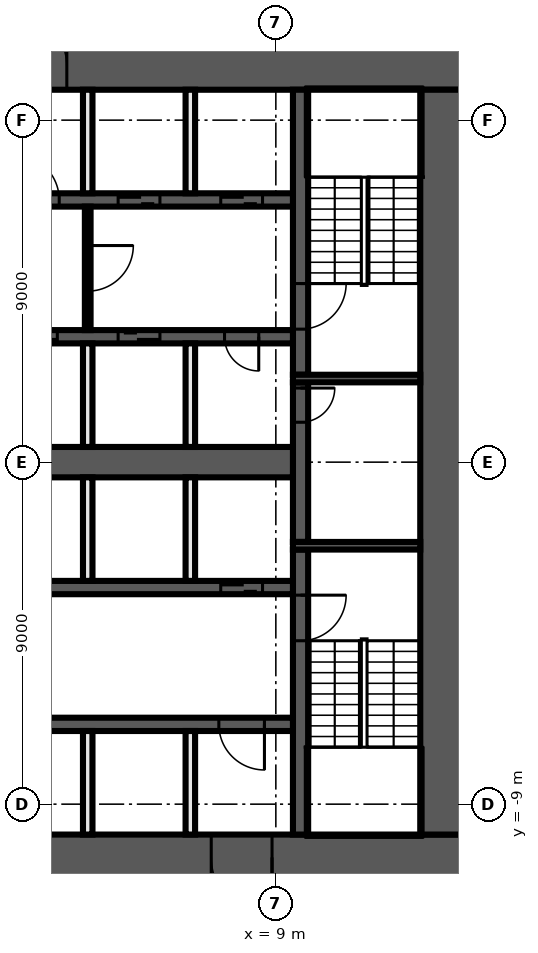
"""IFC4 building model, lengths in metres.
Left out: names, types, materials, properties, quantities, classifications, styles, units other than length and angle.
Written with IfcOpenShell. Run it as: python <this file> out.ifc"""

import sys

from ifc_helpers import new_model, si_unit, direction, frame, frame_2d, origin, place, context, subcontext, project, spatial, rectangle, extrude, element, fill, save


model = new_model("IFC4")
c1 = context("Model", 3, precision=1e-05, world=origin(), true_north=direction((0.0, 1.0)))
c2 = subcontext(c1, "Body", "Model", "MODEL_VIEW")
j1 = project(units=[si_unit("LENGTHUNIT", "METRE"), si_unit("PLANEANGLEUNIT", "RADIAN")], contexts=[c1])
p1 = place(None, origin())
s1 = spatial("IfcSite", under=j1, at=p1, CompositionType="ELEMENT")
p2 = place(p1, origin())
s2 = spatial("IfcBuilding", under=s1, at=p2, CompositionType="ELEMENT")
p3 = place(p2, frame((0.0, 0.0, 47.7)))
s3 = spatial("IfcBuildingStorey", under=s2, at=p3, CompositionType="ELEMENT", Elevation=47.7)
p4 = place(p3, frame((-14.0, 10.4, 0.0), z_axis=(0.0, 0.0, 1.0), x_axis=(1.0, 0.0, 0.0)))
e1 = element("IfcWall", 1, at=p4, inside=s3, PredefinedType="SHEAR", context=c2, shape_type="SweptSolid", body=[
    extrude(rectangle(XDim=28.0, YDim=1.2, at=frame_2d((14.0, 0.0))), origin(), (0.0, 0.0, 1.0), 3.3),
])
p5 = place(p4, frame((15.9, 0.0, 0.0)))
e2 = element("IfcOpeningElement", 2, at=p5, cuts=e1, PredefinedType="OPENING", context=c2, shape_type="SweptSolid", body=[
    extrude(rectangle(XDim=1.6, YDim=2.1, at=frame_2d((0.8, 1.05))), frame((0.0, 0.61, 0.0), z_axis=(0.0, -1.0, 0.0), x_axis=(1.0, 0.0, 0.0)), (0.0, 0.0, 1.0), 1.22),
])
p6 = place(p3, frame((14.0, -10.4, 0.0), z_axis=(0.0, 0.0, 1.0), x_axis=(-1.0, 0.0, 0.0)))
e3 = element("IfcWall", 3, at=p6, inside=s3, PredefinedType="SHEAR", context=c2, shape_type="SweptSolid", body=[
    extrude(rectangle(XDim=28.0, YDim=1.2, at=frame_2d((14.0, 0.0))), origin(), (0.0, 0.0, 1.0), 3.3),
])
p7 = place(p6, frame((5.1, 0.0, 0.0)))
e4 = element("IfcOpeningElement", 4, at=p7, cuts=e3, PredefinedType="OPENING", context=c2, shape_type="SweptSolid", body=[
    extrude(rectangle(XDim=1.6, YDim=2.1, at=frame_2d((0.8, 1.05))), frame((0.0, 0.61, 0.0), z_axis=(0.0, -1.0, 0.0), x_axis=(1.0, 0.0, 0.0)), (0.0, 0.0, 1.0), 1.22),
])
p8 = place(p3, frame((13.4, 9.8, 0.0), z_axis=(0.0, 0.0, 1.0), x_axis=(0.0, -1.0, 0.0)))
e5 = element("IfcWall", 5, at=p8, inside=s3, PredefinedType="SHEAR", context=c2, shape_type="SweptSolid", body=[
    extrude(rectangle(XDim=19.6, YDim=1.2, at=frame_2d((9.8, 0.0))), origin(), (0.0, 0.0, 1.0), 3.3),
])
p9 = place(p3, frame((9.65, -2.3, 0.0), z_axis=(0.0, 0.0, 1.0), x_axis=(0.0, -1.0, 0.0)))
e6 = element("IfcWall", 6, at=p9, inside=s3, PredefinedType="SHEAR", context=c2, shape_type="SweptSolid", body=[
    extrude(rectangle(XDim=7.5, YDim=0.4, at=frame_2d((3.75, 0.0))), origin(), (0.0, 0.0, 1.0), 3.3),
])
p10 = place(p9, frame((1.2, 0.0, 0.0)))
e7 = element("IfcOpeningElement", 7, at=p10, cuts=e6, PredefinedType="OPENING", context=c2, shape_type="SweptSolid", body=[
    extrude(rectangle(XDim=1.2, YDim=2.1, at=frame_2d((0.6, 1.05))), frame((0.0, 0.21, 0.0), z_axis=(0.0, -1.0, 0.0), x_axis=(1.0, 0.0, 0.0)), (0.0, 0.0, 1.0), 0.42),
])
p11 = place(p3, frame((9.65, 2.1, 0.0), z_axis=(0.0, 0.0, 1.0), x_axis=(0.0, -1.0, 0.0)))
e8 = element("IfcWall", 8, at=p11, inside=s3, PredefinedType="SHEAR", context=c2, shape_type="SweptSolid", body=[
    extrude(rectangle(XDim=4.2, YDim=0.4, at=frame_2d((2.1, 0.0))), origin(), (0.0, 0.0, 1.0), 3.3),
])
p12 = place(p11, frame((0.15, 0.0, 0.0)))
e9 = element("IfcOpeningElement", 9, at=p12, cuts=e8, PredefinedType="OPENING", context=c2, shape_type="SweptSolid", body=[
    extrude(rectangle(XDim=0.9, YDim=2.1, at=frame_2d((0.45, 1.05))), frame((0.0, 0.21, 0.0), z_axis=(0.0, -1.0, 0.0), x_axis=(1.0, 0.0, 0.0)), (0.0, 0.0, 1.0), 0.42),
])
p13 = place(p3, frame((9.65, 9.8, 0.0), z_axis=(0.0, 0.0, 1.0), x_axis=(0.0, -1.0, 0.0)))
e10 = element("IfcWall", 10, at=p13, inside=s3, PredefinedType="SHEAR", context=c2, shape_type="SweptSolid", body=[
    extrude(rectangle(XDim=7.5, YDim=0.4, at=frame_2d((3.75, 0.0))), origin(), (0.0, 0.0, 1.0), 3.3),
])
p14 = place(p13, frame((5.1, 0.0, 0.0)))
e11 = element("IfcOpeningElement", 11, at=p14, cuts=e10, PredefinedType="OPENING", context=c2, shape_type="SweptSolid", body=[
    extrude(rectangle(XDim=1.2, YDim=2.1, at=frame_2d((0.6, 1.05))), frame((0.0, 0.21, 0.0), z_axis=(0.0, -1.0, 0.0), x_axis=(1.0, 0.0, 0.0)), (0.0, 0.0, 1.0), 0.42),
])
for number, where, z_axis, x_axis in (
    (12, (9.45, 2.2, 0.0), (0.0, 0.0, 1.0), (1.0, 0.0, 0.0)),
    (13, (9.45, -2.2, 0.0), (0.0, 0.0, 1.0), (1.0, 0.0, 0.0)),
):
    element("IfcWall", number, at=place(p3, frame(where, z_axis=z_axis, x_axis=x_axis)), inside=s3, PredefinedType="SHEAR", context=c2, shape_type="SweptSolid", body=[
        extrude(rectangle(XDim=3.35, YDim=0.2, at=frame_2d((1.675, 0.0))), origin(), (0.0, 0.0, 1.0), 3.3),
    ])
p15 = place(p3, frame((-9.45, 6.9, 0.0), z_axis=(0.0, 0.0, 1.0), x_axis=(1.0, 0.0, 0.0)))
e14 = element("IfcWall", 14, at=p15, inside=s3, PredefinedType="SHEAR", context=c2, shape_type="SweptSolid", body=[
    extrude(rectangle(XDim=18.9, YDim=0.35, at=frame_2d((9.45, 0.0))), origin(), (0.0, 0.0, 1.0), 3.3),
])
p16 = place(p15, frame((0.8, 0.0, 0.0)))
e15 = element("IfcOpeningElement", 15, at=p16, cuts=e14, PredefinedType="OPENING", context=c2, shape_type="SweptSolid", body=[
    extrude(rectangle(XDim=1.1, YDim=2.1, at=frame_2d((0.55, 1.05))), frame((0.0, 0.185, 0.0), z_axis=(0.0, -1.0, 0.0), x_axis=(1.0, 0.0, 0.0)), (0.0, 0.0, 1.0), 0.37),
])
p17 = place(p15, frame((3.5, 0.0, 0.0)))
e16 = element("IfcOpeningElement", 16, at=p17, cuts=e14, PredefinedType="OPENING", context=c2, shape_type="SweptSolid", body=[
    extrude(rectangle(XDim=1.1, YDim=2.1, at=frame_2d((0.55, 1.05))), frame((0.0, 0.185, 0.0), z_axis=(0.0, -1.0, 0.0), x_axis=(1.0, 0.0, 0.0)), (0.0, 0.0, 1.0), 0.37),
])
p18 = place(p15, frame((6.2, 0.0, 0.0)))
e17 = element("IfcOpeningElement", 17, at=p18, cuts=e14, PredefinedType="OPENING", context=c2, shape_type="SweptSolid", body=[
    extrude(rectangle(XDim=1.1, YDim=2.1, at=frame_2d((0.55, 1.05))), frame((0.0, 0.185, 0.0), z_axis=(0.0, -1.0, 0.0), x_axis=(1.0, 0.0, 0.0)), (0.0, 0.0, 1.0), 0.37),
])
p19 = place(p15, frame((8.9, 0.0, 0.0)))
e18 = element("IfcOpeningElement", 18, at=p19, cuts=e14, PredefinedType="OPENING", context=c2, shape_type="SweptSolid", body=[
    extrude(rectangle(XDim=1.1, YDim=2.1, at=frame_2d((0.55, 1.05))), frame((0.0, 0.185, 0.0), z_axis=(0.0, -1.0, 0.0), x_axis=(1.0, 0.0, 0.0)), (0.0, 0.0, 1.0), 0.37),
])
p20 = place(p15, frame((11.55, 0.0, 0.0)))
e19 = element("IfcOpeningElement", 19, at=p20, cuts=e14, PredefinedType="OPENING", context=c2, shape_type="SweptSolid", body=[
    extrude(rectangle(XDim=1.2, YDim=2.1, at=frame_2d((0.6, 1.05))), frame((0.0, 0.185, 0.0), z_axis=(0.0, -1.0, 0.0), x_axis=(1.0, 0.0, 0.0)), (0.0, 0.0, 1.0), 0.37),
])
p21 = place(p15, frame((14.3, 0.0, 0.0)))
e20 = element("IfcOpeningElement", 20, at=p21, cuts=e14, PredefinedType="OPENING", context=c2, shape_type="SweptSolid", body=[
    extrude(rectangle(XDim=1.1, YDim=2.1, at=frame_2d((0.55, 1.05))), frame((0.0, 0.185, 0.0), z_axis=(0.0, -1.0, 0.0), x_axis=(1.0, 0.0, 0.0)), (0.0, 0.0, 1.0), 0.37),
])
p22 = place(p15, frame((17.0, 0.0, 0.0)))
e21 = element("IfcOpeningElement", 21, at=p22, cuts=e14, PredefinedType="OPENING", context=c2, shape_type="SweptSolid", body=[
    extrude(rectangle(XDim=1.1, YDim=2.1, at=frame_2d((0.55, 1.05))), frame((0.0, 0.185, 0.0), z_axis=(0.0, -1.0, 0.0), x_axis=(1.0, 0.0, 0.0)), (0.0, 0.0, 1.0), 0.37),
])
p23 = place(p3, frame((9.45, 3.3, 0.0), z_axis=(0.0, 0.0, 1.0), x_axis=(-1.0, 0.0, 0.0)))
e22 = element("IfcWall", 22, at=p23, inside=s3, PredefinedType="SHEAR", context=c2, shape_type="SweptSolid", body=[
    extrude(rectangle(XDim=18.9, YDim=0.35, at=frame_2d((9.45, 0.0))), origin(), (0.0, 0.0, 1.0), 3.3),
])
p24 = place(p23, frame((17.0, 0.0, 0.0)))
e23 = element("IfcOpeningElement", 23, at=p24, cuts=e22, PredefinedType="OPENING", context=c2, shape_type="SweptSolid", body=[
    extrude(rectangle(XDim=1.1, YDim=2.1, at=frame_2d((0.55, 1.05))), frame((0.0, 0.185, 0.0), z_axis=(0.0, -1.0, 0.0), x_axis=(1.0, 0.0, 0.0)), (0.0, 0.0, 1.0), 0.37),
])
p25 = place(p23, frame((14.3, 0.0, 0.0)))
e24 = element("IfcOpeningElement", 24, at=p25, cuts=e22, PredefinedType="OPENING", context=c2, shape_type="SweptSolid", body=[
    extrude(rectangle(XDim=1.1, YDim=2.1, at=frame_2d((0.55, 1.05))), frame((0.0, 0.185, 0.0), z_axis=(0.0, -1.0, 0.0), x_axis=(1.0, 0.0, 0.0)), (0.0, 0.0, 1.0), 0.37),
])
p26 = place(p23, frame((11.6, 0.0, 0.0)))
e25 = element("IfcOpeningElement", 25, at=p26, cuts=e22, PredefinedType="OPENING", context=c2, shape_type="SweptSolid", body=[
    extrude(rectangle(XDim=1.1, YDim=2.1, at=frame_2d((0.55, 1.05))), frame((0.0, 0.185, 0.0), z_axis=(0.0, -1.0, 0.0), x_axis=(1.0, 0.0, 0.0)), (0.0, 0.0, 1.0), 0.37),
])
p27 = place(p23, frame((8.9, 0.0, 0.0)))
e26 = element("IfcOpeningElement", 26, at=p27, cuts=e22, PredefinedType="OPENING", context=c2, shape_type="SweptSolid", body=[
    extrude(rectangle(XDim=1.1, YDim=2.1, at=frame_2d((0.55, 1.05))), frame((0.0, 0.185, 0.0), z_axis=(0.0, -1.0, 0.0), x_axis=(1.0, 0.0, 0.0)), (0.0, 0.0, 1.0), 0.37),
])
p28 = place(p23, frame((6.2, 0.0, 0.0)))
e27 = element("IfcOpeningElement", 27, at=p28, cuts=e22, PredefinedType="OPENING", context=c2, shape_type="SweptSolid", body=[
    extrude(rectangle(XDim=1.1, YDim=2.1, at=frame_2d((0.55, 1.05))), frame((0.0, 0.185, 0.0), z_axis=(0.0, -1.0, 0.0), x_axis=(1.0, 0.0, 0.0)), (0.0, 0.0, 1.0), 0.37),
])
p29 = place(p23, frame((3.5, 0.0, 0.0)))
e28 = element("IfcOpeningElement", 28, at=p29, cuts=e22, PredefinedType="OPENING", context=c2, shape_type="SweptSolid", body=[
    extrude(rectangle(XDim=1.1, YDim=2.1, at=frame_2d((0.55, 1.05))), frame((0.0, 0.185, 0.0), z_axis=(0.0, -1.0, 0.0), x_axis=(1.0, 0.0, 0.0)), (0.0, 0.0, 1.0), 0.37),
])
p30 = place(p23, frame((0.9, 0.0, 0.0)))
e29 = element("IfcOpeningElement", 29, at=p30, cuts=e22, PredefinedType="OPENING", context=c2, shape_type="SweptSolid", body=[
    extrude(rectangle(XDim=0.9, YDim=2.1, at=frame_2d((0.45, 1.05))), frame((0.0, 0.185, 0.0), z_axis=(0.0, -1.0, 0.0), x_axis=(1.0, 0.0, 0.0)), (0.0, 0.0, 1.0), 0.37),
])
p31 = place(p3, frame((-9.45, -3.3, 0.0), z_axis=(0.0, 0.0, 1.0), x_axis=(1.0, 0.0, 0.0)))
e30 = element("IfcWall", 30, at=p31, inside=s3, PredefinedType="SHEAR", context=c2, shape_type="SweptSolid", body=[
    extrude(rectangle(XDim=18.9, YDim=0.35, at=frame_2d((9.45, 0.0))), origin(), (0.0, 0.0, 1.0), 3.3),
])
p32 = place(p31, frame((17.0, 0.0, 0.0)))
e31 = element("IfcOpeningElement", 31, at=p32, cuts=e30, PredefinedType="OPENING", context=c2, shape_type="SweptSolid", body=[
    extrude(rectangle(XDim=1.1, YDim=2.1, at=frame_2d((0.55, 1.05))), frame((0.0, 0.185, 0.0), z_axis=(0.0, -1.0, 0.0), x_axis=(1.0, 0.0, 0.0)), (0.0, 0.0, 1.0), 0.37),
])
p33 = place(p31, frame((2.25, 0.0, 0.0)))
e32 = element("IfcOpeningElement", 32, at=p33, cuts=e30, PredefinedType="OPENING", context=c2, shape_type="SweptSolid", body=[
    extrude(rectangle(XDim=0.9, YDim=2.1, at=frame_2d((0.45, 1.05))), frame((0.0, 0.185, 0.0), z_axis=(0.0, -1.0, 0.0), x_axis=(1.0, 0.0, 0.0)), (0.0, 0.0, 1.0), 0.37),
])
p34 = place(p31, frame((7.65, 0.0, 0.0)))
e33 = element("IfcOpeningElement", 33, at=p34, cuts=e30, PredefinedType="OPENING", context=c2, shape_type="SweptSolid", body=[
    extrude(rectangle(XDim=0.9, YDim=2.1, at=frame_2d((0.45, 1.05))), frame((0.0, 0.185, 0.0), z_axis=(0.0, -1.0, 0.0), x_axis=(1.0, 0.0, 0.0)), (0.0, 0.0, 1.0), 0.37),
])
p35 = place(p3, frame((9.45, -6.9, 0.0), z_axis=(0.0, 0.0, 1.0), x_axis=(-1.0, 0.0, 0.0)))
e34 = element("IfcWall", 34, at=p35, inside=s3, PredefinedType="SHEAR", context=c2, shape_type="SweptSolid", body=[
    extrude(rectangle(XDim=18.9, YDim=0.35, at=frame_2d((9.45, 0.0))), origin(), (0.0, 0.0, 1.0), 3.3),
])
p36 = place(p35, frame((0.75, 0.0, 0.0)))
e35 = element("IfcOpeningElement", 35, at=p36, cuts=e34, PredefinedType="OPENING", context=c2, shape_type="SweptSolid", body=[
    extrude(rectangle(XDim=1.2, YDim=2.1, at=frame_2d((0.6, 1.05))), frame((0.0, 0.185, 0.0), z_axis=(0.0, -1.0, 0.0), x_axis=(1.0, 0.0, 0.0)), (0.0, 0.0, 1.0), 0.37),
])
p37 = place(p35, frame((14.4, 0.0, 0.0)))
e36 = element("IfcOpeningElement", 36, at=p37, cuts=e34, PredefinedType="OPENING", context=c2, shape_type="SweptSolid", body=[
    extrude(rectangle(XDim=0.9, YDim=2.1, at=frame_2d((0.45, 1.05))), frame((0.0, 0.185, 0.0), z_axis=(0.0, -1.0, 0.0), x_axis=(1.0, 0.0, 0.0)), (0.0, 0.0, 1.0), 0.37),
])
p38 = place(p35, frame((9.0, 0.0, 0.0)))
e37 = element("IfcOpeningElement", 37, at=p38, cuts=e34, PredefinedType="OPENING", context=c2, shape_type="SweptSolid", body=[
    extrude(rectangle(XDim=0.9, YDim=2.1, at=frame_2d((0.45, 1.05))), frame((0.0, 0.185, 0.0), z_axis=(0.0, -1.0, 0.0), x_axis=(1.0, 0.0, 0.0)), (0.0, 0.0, 1.0), 0.37),
])
p39 = place(p3, frame((-9.45, 0.0, 0.0), z_axis=(0.0, 0.0, 1.0), x_axis=(1.0, 0.0, 0.0)))
e38 = element("IfcWall", 38, at=p39, inside=s3, PredefinedType="SHEAR", context=c2, shape_type="SweptSolid", body=[
    extrude(rectangle(XDim=18.9, YDim=0.8, at=frame_2d((9.45, 0.0))), origin(), (0.0, 0.0, 1.0), 3.3),
])
for number, where, z_axis, x_axis in (
    (39, (6.75, -9.8, 0.0), (0.0, 0.0, 1.0), (0.0, 1.0, 0.0)),
    (40, (6.75, -3.125, 0.0), (0.0, 0.0, 1.0), (0.0, 1.0, 0.0)),
    (41, (6.75, 0.4, 0.0), (0.0, 0.0, 1.0), (0.0, 1.0, 0.0)),
    (42, (6.75, 7.075, 0.0), (0.0, 0.0, 1.0), (0.0, 1.0, 0.0)),
):
    element("IfcWall", number, at=place(p3, frame(where, z_axis=z_axis, x_axis=x_axis)), inside=s3, PredefinedType="SOLIDWALL", context=c2, shape_type="SweptSolid", body=[
        extrude(rectangle(XDim=2.725, YDim=0.25, at=frame_2d((1.363, 0.0))), origin(), (0.0, 0.0, 1.0), 3.3),
    ])
p40 = place(p3, frame((4.05, 6.725, 0.0), z_axis=(0.0, 0.0, 1.0), x_axis=(0.0, -1.0, 0.0)))
e43 = element("IfcWall", 43, at=p40, inside=s3, PredefinedType="PARTITIONING", context=c2, shape_type="SweptSolid", body=[
    extrude(rectangle(XDim=3.25, YDim=0.15, at=frame_2d((1.625, 0.0))), origin(), (0.0, 0.0, 1.0), 3.3),
])
p41 = place(p40, frame((1.025, 0.0, 0.0)))
e44 = element("IfcOpeningElement", 44, at=p41, cuts=e43, PredefinedType="OPENING", context=c2, shape_type="SweptSolid", body=[
    extrude(rectangle(XDim=1.2, YDim=2.1, at=frame_2d((0.6, 1.05))), frame((0.0, 0.085, 0.0), z_axis=(0.0, -1.0, 0.0), x_axis=(1.0, 0.0, 0.0)), (0.0, 0.0, 1.0), 0.17),
])
for number, where, z_axis, x_axis in (
    (45, (4.05, -9.8, 0.0), (0.0, 0.0, 1.0), (0.0, 1.0, 0.0)),
    (46, (4.05, -3.125, 0.0), (0.0, 0.0, 1.0), (0.0, 1.0, 0.0)),
    (47, (4.05, 0.4, 0.0), (0.0, 0.0, 1.0), (0.0, 1.0, 0.0)),
    (48, (4.05, 7.075, 0.0), (0.0, 0.0, 1.0), (0.0, 1.0, 0.0)),
):
    element("IfcWall", number, at=place(p3, frame(where, z_axis=z_axis, x_axis=x_axis)), inside=s3, PredefinedType="SOLIDWALL", context=c2, shape_type="SweptSolid", body=[
        extrude(rectangle(XDim=2.725, YDim=0.25, at=frame_2d((1.363, 0.0))), origin(), (0.0, 0.0, 1.0), 3.3),
    ])
p42 = place(p12, origin())
e49 = element("IfcDoor", 49, at=p42, inside=s3, OperationType="SINGLE_SWING_RIGHT", PredefinedType="DOOR", context=c2, shape_type="SweptSolid", body=[
    extrude(rectangle(XDim=0.9, YDim=2.1, at=frame_2d((0.45, 1.05))), frame((0.0, 0.025, 0.0), z_axis=(0.0, -1.0, 0.0), x_axis=(1.0, 0.0, 0.0)), (0.0, 0.0, 1.0), 0.05),
])
fill(e9, e49)
p43 = place(p5, origin())
e50 = element("IfcDoor", 50, at=p43, inside=s3, OperationType="DOUBLE_DOOR_SINGLE_SWING", PredefinedType="DOOR", context=c2, shape_type="SweptSolid", body=[
    extrude(rectangle(XDim=1.6, YDim=2.1, at=frame_2d((0.8, 1.05))), frame((0.0, 0.025, 0.0), z_axis=(0.0, -1.0, 0.0), x_axis=(1.0, 0.0, 0.0)), (0.0, 0.0, 1.0), 0.05),
])
fill(e2, e50)
p44 = place(p20, origin())
e51 = element("IfcDoor", 51, at=p44, inside=s3, OperationType="SINGLE_SWING_LEFT", PredefinedType="DOOR", context=c2, shape_type="SweptSolid", body=[
    extrude(rectangle(XDim=1.2, YDim=2.1, at=frame_2d((0.6, 1.05))), frame((0.0, 0.025, 0.0), z_axis=(0.0, -1.0, 0.0), x_axis=(1.0, 0.0, 0.0)), (0.0, 0.0, 1.0), 0.05),
])
fill(e19, e51)
p45 = place(p21, origin())
e52 = element("IfcDoor", 52, at=p45, inside=s3, OperationType="DOUBLE_DOOR_SLIDING", PredefinedType="DOOR", context=c2, shape_type="SweptSolid", body=[
    extrude(rectangle(XDim=1.1, YDim=2.1, at=frame_2d((0.55, 1.05))), frame((0.0, 0.025, 0.0), z_axis=(0.0, -1.0, 0.0), x_axis=(1.0, 0.0, 0.0)), (0.0, 0.0, 1.0), 0.05),
])
fill(e20, e52)
p46 = place(p22, origin())
e53 = element("IfcDoor", 53, at=p46, inside=s3, OperationType="DOUBLE_DOOR_SLIDING", PredefinedType="DOOR", context=c2, shape_type="SweptSolid", body=[
    extrude(rectangle(XDim=1.1, YDim=2.1, at=frame_2d((0.55, 1.05))), frame((0.0, 0.025, 0.0), z_axis=(0.0, -1.0, 0.0), x_axis=(1.0, 0.0, 0.0)), (0.0, 0.0, 1.0), 0.05),
])
fill(e21, e53)
p47 = place(p28, origin())
e54 = element("IfcDoor", 54, at=p47, inside=s3, OperationType="DOUBLE_DOOR_SLIDING", PredefinedType="DOOR", context=c2, shape_type="SweptSolid", body=[
    extrude(rectangle(XDim=1.1, YDim=2.1, at=frame_2d((0.55, 1.05))), frame((0.0, 0.025, 0.0), z_axis=(0.0, -1.0, 0.0), x_axis=(1.0, 0.0, 0.0)), (0.0, 0.0, 1.0), 0.05),
])
fill(e27, e54)
p48 = place(p29, origin())
e55 = element("IfcDoor", 55, at=p48, inside=s3, OperationType="DOUBLE_DOOR_SLIDING", PredefinedType="DOOR", context=c2, shape_type="SweptSolid", body=[
    extrude(rectangle(XDim=1.1, YDim=2.1, at=frame_2d((0.55, 1.05))), frame((0.0, 0.025, 0.0), z_axis=(0.0, -1.0, 0.0), x_axis=(1.0, 0.0, 0.0)), (0.0, 0.0, 1.0), 0.05),
])
fill(e28, e55)
p49 = place(p30, origin())
e56 = element("IfcDoor", 56, at=p49, inside=s3, OperationType="SINGLE_SWING_LEFT", PredefinedType="DOOR", context=c2, shape_type="SweptSolid", body=[
    extrude(rectangle(XDim=0.9, YDim=2.1, at=frame_2d((0.45, 1.05))), frame((0.0, 0.025, 0.0), z_axis=(0.0, -1.0, 0.0), x_axis=(1.0, 0.0, 0.0)), (0.0, 0.0, 1.0), 0.05),
])
fill(e29, e56)
p50 = place(p32, origin())
e57 = element("IfcDoor", 57, at=p50, inside=s3, OperationType="DOUBLE_DOOR_SLIDING", PredefinedType="DOOR", context=c2, shape_type="SweptSolid", body=[
    extrude(rectangle(XDim=1.1, YDim=2.1, at=frame_2d((0.55, 1.05))), frame((0.0, 0.025, 0.0), z_axis=(0.0, -1.0, 0.0), x_axis=(1.0, 0.0, 0.0)), (0.0, 0.0, 1.0), 0.05),
])
fill(e31, e57)
p51 = place(p7, origin())
e58 = element("IfcDoor", 58, at=p51, inside=s3, OperationType="DOUBLE_DOOR_SINGLE_SWING", PredefinedType="DOOR", context=c2, shape_type="SweptSolid", body=[
    extrude(rectangle(XDim=1.6, YDim=2.1, at=frame_2d((0.8, 1.05))), frame((0.0, 0.025, 0.0), z_axis=(0.0, -1.0, 0.0), x_axis=(1.0, 0.0, 0.0)), (0.0, 0.0, 1.0), 0.05),
])
fill(e4, e58)
p52 = place(p36, origin())
e59 = element("IfcDoor", 59, at=p52, inside=s3, OperationType="SINGLE_SWING_LEFT", PredefinedType="DOOR", context=c2, shape_type="SweptSolid", body=[
    extrude(rectangle(XDim=1.2, YDim=2.1, at=frame_2d((0.6, 1.05))), frame((0.0, 0.025, 0.0), z_axis=(0.0, -1.0, 0.0), x_axis=(1.0, 0.0, 0.0)), (0.0, 0.0, 1.0), 0.05),
])
fill(e35, e59)
p53 = place(p14, origin())
e60 = element("IfcDoor", 60, at=p53, inside=s3, OperationType="SINGLE_SWING_LEFT", PredefinedType="DOOR", context=c2, shape_type="SweptSolid", body=[
    extrude(rectangle(XDim=1.2, YDim=2.1, at=frame_2d((0.6, 1.05))), frame((0.0, 0.025, 0.0), z_axis=(0.0, -1.0, 0.0), x_axis=(1.0, 0.0, 0.0)), (0.0, 0.0, 1.0), 0.05),
])
fill(e11, e60)
p54 = place(p10, origin())
e61 = element("IfcDoor", 61, at=p54, inside=s3, OperationType="SINGLE_SWING_RIGHT", PredefinedType="DOOR", context=c2, shape_type="SweptSolid", body=[
    extrude(rectangle(XDim=1.2, YDim=2.1, at=frame_2d((0.6, 1.05))), frame((0.0, 0.025, 0.0), z_axis=(0.0, -1.0, 0.0), x_axis=(1.0, 0.0, 0.0)), (0.0, 0.0, 1.0), 0.05),
])
fill(e7, e61)
p55 = place(p41, origin())
e62 = element("IfcDoor", 62, at=p55, inside=s3, OperationType="SINGLE_SWING_RIGHT", PredefinedType="DOOR", context=c2, shape_type="SweptSolid", body=[
    extrude(rectangle(XDim=1.2, YDim=2.1, at=frame_2d((0.6, 1.05))), frame((0.0, 0.025, 0.0), z_axis=(0.0, -1.0, 0.0), x_axis=(1.0, 0.0, 0.0)), (0.0, 0.0, 1.0), 0.05),
])
fill(e44, e62)
save(model, sys.argv[1])
